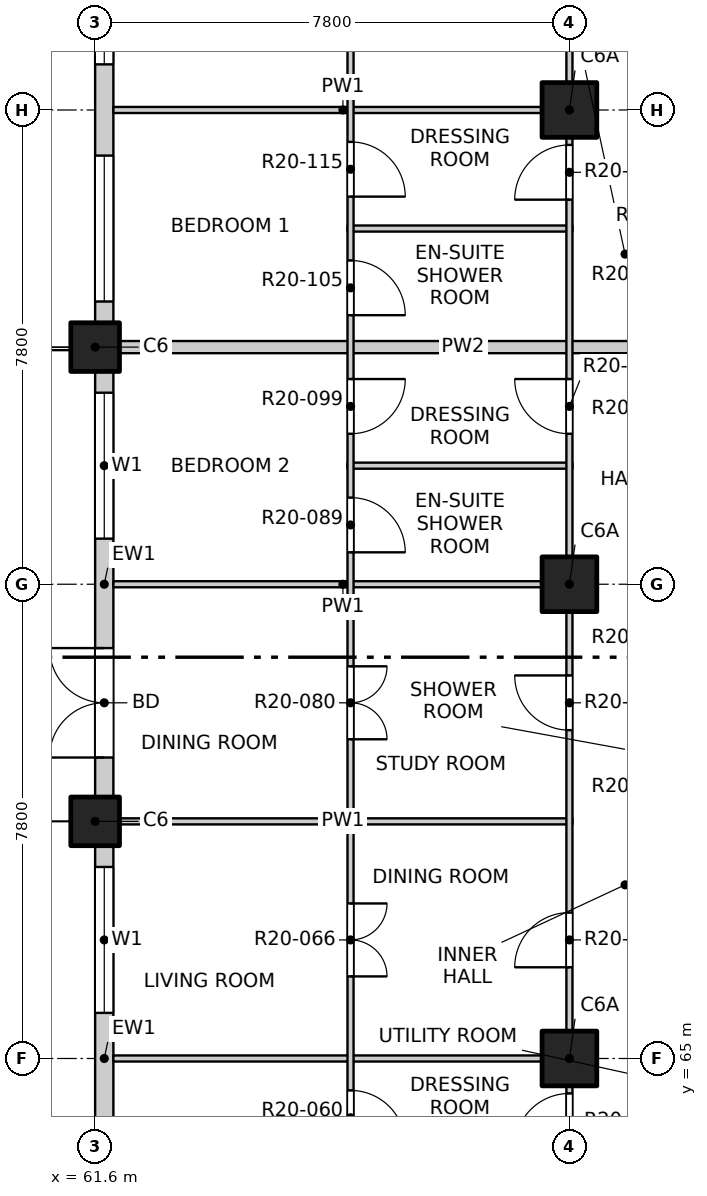
"""IFC4 building model, lengths in metres.
Left out: names, types, materials, properties, quantities, classifications, styles, units other than length and angle.
Written with IfcOpenShell. Run it as: python <this file> out.ifc"""

import sys

from ifc_helpers import new_model, si_unit, direction, frame, frame_2d, origin, origin_2d, place, context, subcontext, project, spatial, rectangle, extrude, element, fill, save


model = new_model("IFC4")
c1 = context("Model", 3, precision=1e-05, world=origin(), true_north=direction((0.0, 1.0)))
c2 = subcontext(c1, "Body", "Model", "MODEL_VIEW")
j1 = project(units=[si_unit("LENGTHUNIT", "METRE"), si_unit("PLANEANGLEUNIT", "RADIAN")], contexts=[c1])
p1 = place(None, origin())
s1 = spatial("IfcSite", under=j1, at=p1, CompositionType="ELEMENT")
p2 = place(p1, origin())
s2 = spatial("IfcBuilding", under=s1, at=p2, CompositionType="ELEMENT")
p3 = place(p2, frame((0.0, 0.0, 204.1)))
s3 = spatial("IfcBuildingStorey", under=s2, at=p3, CompositionType="ELEMENT", Elevation=204.1)
for number, where, z_axis, x_axis in (
    (1, (61.6, 68.9, -0.25), (0.0, 0.0, 1.0), (1.0, 0.0, 0.0)),
    (2, (61.6, 76.7, -0.25), (0.0, 0.0, 1.0), (1.0, 0.0, 0.0)),
):
    element("IfcColumn", number, at=place(p3, frame(where, z_axis=z_axis, x_axis=x_axis)), inside=s3, PredefinedType="COLUMN", context=c2, shape_type="SweptSolid", body=[
        extrude(rectangle(XDim=0.8, YDim=0.8, at=origin_2d()), origin(), (0.0, 0.0, 1.0), 3.4),
    ])
for number, where, z_axis, x_axis in (
    (3, (69.4, 65.0, -0.25), (0.0, 0.0, 1.0), (1.0, 0.0, 0.0)),
    (4, (69.4, 72.8, -0.25), (0.0, 0.0, 1.0), (1.0, 0.0, 0.0)),
    (5, (69.4, 80.6, -0.25), (0.0, 0.0, 1.0), (1.0, 0.0, 0.0)),
):
    element("IfcColumn", number, at=place(p3, frame(where, z_axis=z_axis, x_axis=x_axis)), inside=s3, PredefinedType="COLUMN", context=c2, shape_type="SweptSolid", body=[
        extrude(rectangle(XDim=0.9, YDim=0.9, at=origin_2d()), origin(), (0.0, 0.0, 1.0), 3.4),
    ])
p4 = place(p3, frame((61.75, 61.5, 0.0), z_axis=(0.0, 0.0, 1.0), x_axis=(0.0, 1.0, 0.0)))
e6 = element("IfcWall", 6, at=p4, inside=s3, PredefinedType="SOLIDWALL", context=c2, shape_type="SweptSolid", body=[
    extrude(rectangle(XDim=7.0, YDim=0.3, at=frame_2d((3.5, 0.0))), origin(), (0.0, 0.0, 1.0), 2.7),
])
p5 = place(p4, frame((0.65, 0.0, 0.0)))
e7 = element("IfcOpeningElement", 7, at=p5, cuts=e6, PredefinedType="OPENING", context=c2, shape_type="SweptSolid", body=[
    extrude(rectangle(XDim=1.8, YDim=2.4, at=frame_2d((0.9, 1.2))), frame((0.0, 0.16, 0.0), z_axis=(0.0, -1.0, 0.0), x_axis=(1.0, 0.0, 0.0)), (0.0, 0.0, 1.0), 0.32),
])
p6 = place(p4, frame((4.25, 0.0, 0.9)))
e8 = element("IfcOpeningElement", 8, at=p6, cuts=e6, PredefinedType="OPENING", context=c2, shape_type="SweptSolid", body=[
    extrude(rectangle(XDim=2.4, YDim=1.8, at=frame_2d((1.2, 0.9))), frame((0.0, 0.16, 0.0), z_axis=(0.0, -1.0, 0.0), x_axis=(1.0, 0.0, 0.0)), (0.0, 0.0, 1.0), 0.32),
])
p7 = place(p3, frame((61.75, 69.3, 0.0), z_axis=(0.0, 0.0, 1.0), x_axis=(0.0, 1.0, 0.0)))
e9 = element("IfcWall", 9, at=p7, inside=s3, PredefinedType="SOLIDWALL", context=c2, shape_type="SweptSolid", body=[
    extrude(rectangle(XDim=7.0, YDim=0.3, at=frame_2d((3.5, 0.0))), origin(), (0.0, 0.0, 1.0), 2.7),
])
p8 = place(p7, frame((0.65, 0.0, 0.0)))
e10 = element("IfcOpeningElement", 10, at=p8, cuts=e9, PredefinedType="OPENING", context=c2, shape_type="SweptSolid", body=[
    extrude(rectangle(XDim=1.8, YDim=2.4, at=frame_2d((0.9, 1.2))), frame((0.0, 0.16, 0.0), z_axis=(0.0, -1.0, 0.0), x_axis=(1.0, 0.0, 0.0)), (0.0, 0.0, 1.0), 0.32),
])
p9 = place(p7, frame((4.25, 0.0, 0.9)))
e11 = element("IfcOpeningElement", 11, at=p9, cuts=e9, PredefinedType="OPENING", context=c2, shape_type="SweptSolid", body=[
    extrude(rectangle(XDim=2.4, YDim=1.8, at=frame_2d((1.2, 0.9))), frame((0.0, 0.16, 0.0), z_axis=(0.0, -1.0, 0.0), x_axis=(1.0, 0.0, 0.0)), (0.0, 0.0, 1.0), 0.32),
])
p10 = place(p3, frame((61.75, 77.1, 0.0), z_axis=(0.0, 0.0, 1.0), x_axis=(0.0, 1.0, 0.0)))
e12 = element("IfcWall", 12, at=p10, inside=s3, PredefinedType="SOLIDWALL", context=c2, shape_type="SweptSolid", body=[
    extrude(rectangle(XDim=7.4, YDim=0.3, at=frame_2d((3.7, 0.0))), origin(), (0.0, 0.0, 1.0), 2.7),
])
p11 = place(p10, frame((0.35, 0.0, 0.9)))
e13 = element("IfcOpeningElement", 13, at=p11, cuts=e12, PredefinedType="OPENING", context=c2, shape_type="SweptSolid", body=[
    extrude(rectangle(XDim=2.4, YDim=1.8, at=frame_2d((1.2, 0.9))), frame((0.0, 0.16, 0.0), z_axis=(0.0, -1.0, 0.0), x_axis=(1.0, 0.0, 0.0)), (0.0, 0.0, 1.0), 0.32),
])
p12 = place(p10, frame((4.25, 0.0, 0.9)))
e14 = element("IfcOpeningElement", 14, at=p12, cuts=e12, PredefinedType="OPENING", context=c2, shape_type="SweptSolid", body=[
    extrude(rectangle(XDim=2.4, YDim=1.8, at=frame_2d((1.2, 0.9))), frame((0.0, 0.16, 0.0), z_axis=(0.0, -1.0, 0.0), x_axis=(1.0, 0.0, 0.0)), (0.0, 0.0, 1.0), 0.32),
])
p13 = place(p3, frame((61.9, 65.0, 0.0), z_axis=(0.0, 0.0, 1.0), x_axis=(1.0, 0.0, 0.0)))
e15 = element("IfcWall", 15, at=p13, inside=s3, PredefinedType="PARTITIONING", context=c2, shape_type="SweptSolid", body=[
    extrude(rectangle(XDim=7.55, YDim=0.1, at=frame_2d((3.775, 0.0))), origin(), (0.0, 0.0, 1.0), 3.15),
])
p14 = place(p3, frame((61.9, 68.9, 0.0), z_axis=(0.0, 0.0, 1.0), x_axis=(1.0, 0.0, 0.0)))
e16 = element("IfcWall", 16, at=p14, inside=s3, PredefinedType="PARTITIONING", context=c2, shape_type="SweptSolid", body=[
    extrude(rectangle(XDim=7.55, YDim=0.1, at=frame_2d((3.775, 0.0))), origin(), (0.0, 0.0, 1.0), 2.55),
])
p15 = place(p3, frame((61.9, 72.8, 0.0), z_axis=(0.0, 0.0, 1.0), x_axis=(1.0, 0.0, 0.0)))
e17 = element("IfcWall", 17, at=p15, inside=s3, PredefinedType="PARTITIONING", context=c2, shape_type="SweptSolid", body=[
    extrude(rectangle(XDim=7.55, YDim=0.1, at=frame_2d((3.775, 0.0))), origin(), (0.0, 0.0, 1.0), 3.15),
])
p16 = place(p3, frame((65.75, 74.75, 0.0), z_axis=(0.0, 0.0, 1.0), x_axis=(1.0, 0.0, 0.0)))
e18 = element("IfcWall", 18, at=p16, inside=s3, PredefinedType="PARTITIONING", context=c2, shape_type="SweptSolid", body=[
    extrude(rectangle(XDim=3.7, YDim=0.1, at=frame_2d((1.85, 0.0))), origin(), (0.0, 0.0, 1.0), 3.15),
])
p17 = place(p3, frame((61.9, 76.7, 0.0), z_axis=(0.0, 0.0, 1.0), x_axis=(1.0, 0.0, 0.0)))
e19 = element("IfcWall", 19, at=p17, inside=s3, PredefinedType="PARTITIONING", context=c2, shape_type="SweptSolid", body=[
    extrude(rectangle(XDim=11.5, YDim=0.2, at=frame_2d((5.75, 0.0))), origin(), (0.0, 0.0, 1.0), 2.55),
])
p18 = place(p3, frame((65.75, 78.65, 0.0), z_axis=(0.0, 0.0, 1.0), x_axis=(1.0, 0.0, 0.0)))
e20 = element("IfcWall", 20, at=p18, inside=s3, PredefinedType="PARTITIONING", context=c2, shape_type="SweptSolid", body=[
    extrude(rectangle(XDim=3.7, YDim=0.1, at=frame_2d((1.85, 0.0))), origin(), (0.0, 0.0, 1.0), 3.15),
])
p19 = place(p3, frame((61.9, 80.6, 0.0), z_axis=(0.0, 0.0, 1.0), x_axis=(1.0, 0.0, 0.0)))
e21 = element("IfcWall", 21, at=p19, inside=s3, PredefinedType="PARTITIONING", context=c2, shape_type="SweptSolid", body=[
    extrude(rectangle(XDim=7.55, YDim=0.1, at=frame_2d((3.775, 0.0))), origin(), (0.0, 0.0, 1.0), 3.15),
])
p20 = place(p3, frame((65.8, 61.2, 0.0), z_axis=(0.0, 0.0, 1.0), x_axis=(0.0, 1.0, 0.0)))
e22 = element("IfcWall", 22, at=p20, inside=s3, PredefinedType="PARTITIONING", context=c2, shape_type="SweptSolid", body=[
    extrude(rectangle(XDim=26.9, YDim=0.1, at=frame_2d((13.45, 0.0))), origin(), (0.0, 0.0, 1.0), 3.15),
])
p21 = place(p20, frame((0.425, 0.0, 0.0)))
e23 = element("IfcOpeningElement", 23, at=p21, cuts=e22, PredefinedType="OPENING", context=c2, shape_type="SweptSolid", body=[
    extrude(rectangle(XDim=0.9, YDim=2.1, at=frame_2d((0.45, 1.05))), frame((0.0, 0.06, 0.0), z_axis=(0.0, -1.0, 0.0), x_axis=(1.0, 0.0, 0.0)), (0.0, 0.0, 1.0), 0.12),
])
p22 = place(p20, frame((2.375, 0.0, 0.0)))
e24 = element("IfcOpeningElement", 24, at=p22, cuts=e22, PredefinedType="OPENING", context=c2, shape_type="SweptSolid", body=[
    extrude(rectangle(XDim=0.9, YDim=2.1, at=frame_2d((0.45, 1.05))), frame((0.0, 0.06, 0.0), z_axis=(0.0, -1.0, 0.0), x_axis=(1.0, 0.0, 0.0)), (0.0, 0.0, 1.0), 0.12),
])
p23 = place(p20, frame((5.15, 0.0, 0.0)))
e25 = element("IfcOpeningElement", 25, at=p23, cuts=e22, PredefinedType="OPENING", context=c2, shape_type="SweptSolid", body=[
    extrude(rectangle(XDim=1.2, YDim=2.1, at=frame_2d((0.6, 1.05))), frame((0.0, 0.06, 0.0), z_axis=(0.0, -1.0, 0.0), x_axis=(1.0, 0.0, 0.0)), (0.0, 0.0, 1.0), 0.12),
])
p24 = place(p20, frame((9.05, 0.0, 0.0)))
e26 = element("IfcOpeningElement", 26, at=p24, cuts=e22, PredefinedType="OPENING", context=c2, shape_type="SweptSolid", body=[
    extrude(rectangle(XDim=1.2, YDim=2.1, at=frame_2d((0.6, 1.05))), frame((0.0, 0.06, 0.0), z_axis=(0.0, -1.0, 0.0), x_axis=(1.0, 0.0, 0.0)), (0.0, 0.0, 1.0), 0.12),
])
p25 = place(p20, frame((12.125, 0.0, 0.0)))
e27 = element("IfcOpeningElement", 27, at=p25, cuts=e22, PredefinedType="OPENING", context=c2, shape_type="SweptSolid", body=[
    extrude(rectangle(XDim=0.9, YDim=2.1, at=frame_2d((0.45, 1.05))), frame((0.0, 0.06, 0.0), z_axis=(0.0, -1.0, 0.0), x_axis=(1.0, 0.0, 0.0)), (0.0, 0.0, 1.0), 0.12),
])
p26 = place(p20, frame((14.075, 0.0, 0.0)))
e28 = element("IfcOpeningElement", 28, at=p26, cuts=e22, PredefinedType="OPENING", context=c2, shape_type="SweptSolid", body=[
    extrude(rectangle(XDim=0.9, YDim=2.1, at=frame_2d((0.45, 1.05))), frame((0.0, 0.06, 0.0), z_axis=(0.0, -1.0, 0.0), x_axis=(1.0, 0.0, 0.0)), (0.0, 0.0, 1.0), 0.12),
])
p27 = place(p20, frame((16.025, 0.0, 0.0)))
e29 = element("IfcOpeningElement", 29, at=p27, cuts=e22, PredefinedType="OPENING", context=c2, shape_type="SweptSolid", body=[
    extrude(rectangle(XDim=0.9, YDim=2.1, at=frame_2d((0.45, 1.05))), frame((0.0, 0.06, 0.0), z_axis=(0.0, -1.0, 0.0), x_axis=(1.0, 0.0, 0.0)), (0.0, 0.0, 1.0), 0.12),
])
p28 = place(p20, frame((17.975, 0.0, 0.0)))
e30 = element("IfcOpeningElement", 30, at=p28, cuts=e22, PredefinedType="OPENING", context=c2, shape_type="SweptSolid", body=[
    extrude(rectangle(XDim=0.9, YDim=2.1, at=frame_2d((0.45, 1.05))), frame((0.0, 0.06, 0.0), z_axis=(0.0, -1.0, 0.0), x_axis=(1.0, 0.0, 0.0)), (0.0, 0.0, 1.0), 0.12),
])
p29 = place(p20, frame((20.75, 0.0, 0.0)))
e31 = element("IfcOpeningElement", 31, at=p29, cuts=e22, PredefinedType="OPENING", context=c2, shape_type="SweptSolid", body=[
    extrude(rectangle(XDim=1.2, YDim=2.1, at=frame_2d((0.6, 1.05))), frame((0.0, 0.06, 0.0), z_axis=(0.0, -1.0, 0.0), x_axis=(1.0, 0.0, 0.0)), (0.0, 0.0, 1.0), 0.12),
])
p30 = place(p20, frame((24.65, 0.0, 0.0)))
e32 = element("IfcOpeningElement", 32, at=p30, cuts=e22, PredefinedType="OPENING", context=c2, shape_type="SweptSolid", body=[
    extrude(rectangle(XDim=1.2, YDim=2.1, at=frame_2d((0.6, 1.05))), frame((0.0, 0.06, 0.0), z_axis=(0.0, -1.0, 0.0), x_axis=(1.0, 0.0, 0.0)), (0.0, 0.0, 1.0), 0.12),
])
p31 = place(p3, frame((69.4, 41.9, 0.0), z_axis=(0.0, 0.0, 1.0), x_axis=(0.0, 1.0, 0.0)))
e33 = element("IfcWall", 33, at=p31, inside=s3, PredefinedType="PARTITIONING", context=c2, shape_type="SweptSolid", body=[
    extrude(rectangle(XDim=46.2, YDim=0.1, at=frame_2d((23.1, 0.0))), origin(), (0.0, 0.0, 1.0), 3.15),
])
p32 = place(p31, frame((1.2, 0.0, 0.0)))
e34 = element("IfcOpeningElement", 34, at=p32, cuts=e33, PredefinedType="OPENING", context=c2, shape_type="SweptSolid", body=[
    extrude(rectangle(XDim=0.9, YDim=2.1, at=frame_2d((0.45, 1.05))), frame((0.0, 0.06, 0.0), z_axis=(0.0, -1.0, 0.0), x_axis=(1.0, 0.0, 0.0)), (0.0, 0.0, 1.0), 0.12),
])
p33 = place(p31, frame((5.1, 0.0, 0.0)))
e35 = element("IfcOpeningElement", 35, at=p33, cuts=e33, PredefinedType="OPENING", context=c2, shape_type="SweptSolid", body=[
    extrude(rectangle(XDim=0.9, YDim=2.1, at=frame_2d((0.45, 1.05))), frame((0.0, 0.06, 0.0), z_axis=(0.0, -1.0, 0.0), x_axis=(1.0, 0.0, 0.0)), (0.0, 0.0, 1.0), 0.12),
])
p34 = place(p31, frame((9.975, 0.0, 0.0)))
e36 = element("IfcOpeningElement", 36, at=p34, cuts=e33, PredefinedType="OPENING", context=c2, shape_type="SweptSolid", body=[
    extrude(rectangle(XDim=0.9, YDim=2.1, at=frame_2d((0.45, 1.05))), frame((0.0, 0.06, 0.0), z_axis=(0.0, -1.0, 0.0), x_axis=(1.0, 0.0, 0.0)), (0.0, 0.0, 1.0), 0.12),
])
p35 = place(p31, frame((12.9, 0.0, 0.0)))
e37 = element("IfcOpeningElement", 37, at=p35, cuts=e33, PredefinedType="OPENING", context=c2, shape_type="SweptSolid", body=[
    extrude(rectangle(XDim=0.9, YDim=2.1, at=frame_2d((0.45, 1.05))), frame((0.0, 0.06, 0.0), z_axis=(0.0, -1.0, 0.0), x_axis=(1.0, 0.0, 0.0)), (0.0, 0.0, 1.0), 0.12),
])
p36 = place(p31, frame((17.775, 0.0, 0.0)))
e38 = element("IfcOpeningElement", 38, at=p36, cuts=e33, PredefinedType="OPENING", context=c2, shape_type="SweptSolid", body=[
    extrude(rectangle(XDim=0.9, YDim=2.1, at=frame_2d((0.45, 1.05))), frame((0.0, 0.06, 0.0), z_axis=(0.0, -1.0, 0.0), x_axis=(1.0, 0.0, 0.0)), (0.0, 0.0, 1.0), 0.12),
])
p37 = place(p31, frame((21.625, 0.0, 0.0)))
e39 = element("IfcOpeningElement", 39, at=p37, cuts=e33, PredefinedType="OPENING", context=c2, shape_type="SweptSolid", body=[
    extrude(rectangle(XDim=0.9, YDim=2.1, at=frame_2d((0.45, 1.05))), frame((0.0, 0.06, 0.0), z_axis=(0.0, -1.0, 0.0), x_axis=(1.0, 0.0, 0.0)), (0.0, 0.0, 1.0), 0.12),
])
p38 = place(p31, frame((24.6, 0.0, 0.0)))
e40 = element("IfcOpeningElement", 40, at=p38, cuts=e33, PredefinedType="OPENING", context=c2, shape_type="SweptSolid", body=[
    extrude(rectangle(XDim=0.9, YDim=2.1, at=frame_2d((0.45, 1.05))), frame((0.0, 0.06, 0.0), z_axis=(0.0, -1.0, 0.0), x_axis=(1.0, 0.0, 0.0)), (0.0, 0.0, 1.0), 0.12),
])
p39 = place(p31, frame((28.5, 0.0, 0.0)))
e41 = element("IfcOpeningElement", 41, at=p39, cuts=e33, PredefinedType="OPENING", context=c2, shape_type="SweptSolid", body=[
    extrude(rectangle(XDim=0.9, YDim=2.1, at=frame_2d((0.45, 1.05))), frame((0.0, 0.06, 0.0), z_axis=(0.0, -1.0, 0.0), x_axis=(1.0, 0.0, 0.0)), (0.0, 0.0, 1.0), 0.12),
])
p40 = place(p31, frame((33.375, 0.0, 0.0)))
e42 = element("IfcOpeningElement", 42, at=p40, cuts=e33, PredefinedType="OPENING", context=c2, shape_type="SweptSolid", body=[
    extrude(rectangle(XDim=0.9, YDim=2.1, at=frame_2d((0.45, 1.05))), frame((0.0, 0.06, 0.0), z_axis=(0.0, -1.0, 0.0), x_axis=(1.0, 0.0, 0.0)), (0.0, 0.0, 1.0), 0.12),
])
p41 = place(p31, frame((37.225, 0.0, 0.0)))
e43 = element("IfcOpeningElement", 43, at=p41, cuts=e33, PredefinedType="OPENING", context=c2, shape_type="SweptSolid", body=[
    extrude(rectangle(XDim=0.9, YDim=2.1, at=frame_2d((0.45, 1.05))), frame((0.0, 0.06, 0.0), z_axis=(0.0, -1.0, 0.0), x_axis=(1.0, 0.0, 0.0)), (0.0, 0.0, 1.0), 0.12),
])
p42 = place(p31, frame((40.2, 0.0, 0.0)))
e44 = element("IfcOpeningElement", 44, at=p42, cuts=e33, PredefinedType="OPENING", context=c2, shape_type="SweptSolid", body=[
    extrude(rectangle(XDim=0.9, YDim=2.1, at=frame_2d((0.45, 1.05))), frame((0.0, 0.06, 0.0), z_axis=(0.0, -1.0, 0.0), x_axis=(1.0, 0.0, 0.0)), (0.0, 0.0, 1.0), 0.12),
])
p43 = place(p31, frame((44.1, 0.0, 0.0)))
e45 = element("IfcOpeningElement", 45, at=p43, cuts=e33, PredefinedType="OPENING", context=c2, shape_type="SweptSolid", body=[
    extrude(rectangle(XDim=0.9, YDim=2.1, at=frame_2d((0.45, 1.05))), frame((0.0, 0.06, 0.0), z_axis=(0.0, -1.0, 0.0), x_axis=(1.0, 0.0, 0.0)), (0.0, 0.0, 1.0), 0.12),
])
p44 = place(p6, origin())
e46 = element("IfcWindow", 46, at=p44, inside=s3, PartitioningType="DOUBLE_PANEL_VERTICAL", PredefinedType="WINDOW", context=c2, shape_type="SweptSolid", body=[
    extrude(rectangle(XDim=2.4, YDim=1.8, at=frame_2d((1.2, 0.9))), frame((0.0, 0.03, 0.0), z_axis=(0.0, -1.0, 0.0), x_axis=(1.0, 0.0, 0.0)), (0.0, 0.0, 1.0), 0.06),
])
fill(e8, e46)
p45 = place(p8, origin())
e47 = element("IfcDoor", 47, at=p45, inside=s3, OperationType="DOUBLE_DOOR_SINGLE_SWING", PredefinedType="DOOR", context=c2, shape_type="SweptSolid", body=[
    extrude(rectangle(XDim=1.8, YDim=2.4, at=frame_2d((0.9, 1.2))), frame((0.0, 0.025, 0.0), z_axis=(0.0, -1.0, 0.0), x_axis=(1.0, 0.0, 0.0)), (0.0, 0.0, 1.0), 0.05),
])
fill(e10, e47)
p46 = place(p9, origin())
e48 = element("IfcWindow", 48, at=p46, inside=s3, PartitioningType="DOUBLE_PANEL_VERTICAL", PredefinedType="WINDOW", context=c2, shape_type="SweptSolid", body=[
    extrude(rectangle(XDim=2.4, YDim=1.8, at=frame_2d((1.2, 0.9))), frame((0.0, 0.03, 0.0), z_axis=(0.0, -1.0, 0.0), x_axis=(1.0, 0.0, 0.0)), (0.0, 0.0, 1.0), 0.06),
])
fill(e11, e48)
p47 = place(p11, origin())
e49 = element("IfcWindow", 49, at=p47, inside=s3, PartitioningType="DOUBLE_PANEL_VERTICAL", PredefinedType="WINDOW", context=c2, shape_type="SweptSolid", body=[
    extrude(rectangle(XDim=2.4, YDim=1.8, at=frame_2d((1.2, 0.9))), frame((0.0, 0.03, 0.0), z_axis=(0.0, -1.0, 0.0), x_axis=(1.0, 0.0, 0.0)), (0.0, 0.0, 1.0), 0.06),
])
fill(e13, e49)
p48 = place(p12, origin())
e50 = element("IfcWindow", 50, at=p48, inside=s3, PartitioningType="DOUBLE_PANEL_VERTICAL", PredefinedType="WINDOW", context=c2, shape_type="SweptSolid", body=[
    extrude(rectangle(XDim=2.4, YDim=1.8, at=frame_2d((1.2, 0.9))), frame((0.0, 0.03, 0.0), z_axis=(0.0, -1.0, 0.0), x_axis=(1.0, 0.0, 0.0)), (0.0, 0.0, 1.0), 0.06),
])
fill(e14, e50)
p49 = place(p37, origin())
e51 = element("IfcDoor", 51, at=p49, inside=s3, OperationType="SINGLE_SWING_LEFT", PredefinedType="DOOR", context=c2, shape_type="SweptSolid", body=[
    extrude(rectangle(XDim=0.9, YDim=2.1, at=frame_2d((0.45, 1.05))), frame((0.0, 0.025, 0.0), z_axis=(0.0, -1.0, 0.0), x_axis=(1.0, 0.0, 0.0)), (0.0, 0.0, 1.0), 0.05),
])
fill(e39, e51)
p50 = place(p22, origin())
e52 = element("IfcDoor", 52, at=p50, inside=s3, OperationType="SINGLE_SWING_RIGHT", PredefinedType="DOOR", context=c2, shape_type="SweptSolid", body=[
    extrude(rectangle(XDim=0.9, YDim=2.1, at=frame_2d((0.45, 1.05))), frame((0.0, 0.025, 0.0), z_axis=(0.0, -1.0, 0.0), x_axis=(1.0, 0.0, 0.0)), (0.0, 0.0, 1.0), 0.05),
])
fill(e24, e52)
p51 = place(p23, origin())
e53 = element("IfcDoor", 53, at=p51, inside=s3, OperationType="DOUBLE_DOOR_SINGLE_SWING", PredefinedType="DOOR", context=c2, shape_type="SweptSolid", body=[
    extrude(rectangle(XDim=1.2, YDim=2.1, at=frame_2d((0.6, 1.05))), frame((0.0, 0.025, 0.0), z_axis=(0.0, -1.0, 0.0), x_axis=(1.0, 0.0, 0.0)), (0.0, 0.0, 1.0), 0.05),
])
fill(e25, e53)
p52 = place(p38, origin())
e54 = element("IfcDoor", 54, at=p52, inside=s3, OperationType="SINGLE_SWING_LEFT", PredefinedType="DOOR", context=c2, shape_type="SweptSolid", body=[
    extrude(rectangle(XDim=0.9, YDim=2.1, at=frame_2d((0.45, 1.05))), frame((0.0, 0.025, 0.0), z_axis=(0.0, -1.0, 0.0), x_axis=(1.0, 0.0, 0.0)), (0.0, 0.0, 1.0), 0.05),
])
fill(e40, e54)
p53 = place(p24, origin())
e55 = element("IfcDoor", 55, at=p53, inside=s3, OperationType="DOUBLE_DOOR_SINGLE_SWING", PredefinedType="DOOR", context=c2, shape_type="SweptSolid", body=[
    extrude(rectangle(XDim=1.2, YDim=2.1, at=frame_2d((0.6, 1.05))), frame((0.0, 0.025, 0.0), z_axis=(0.0, -1.0, 0.0), x_axis=(1.0, 0.0, 0.0)), (0.0, 0.0, 1.0), 0.05),
])
fill(e26, e55)
p54 = place(p39, origin())
e56 = element("IfcDoor", 56, at=p54, inside=s3, OperationType="SINGLE_SWING_RIGHT", PredefinedType="DOOR", context=c2, shape_type="SweptSolid", body=[
    extrude(rectangle(XDim=0.9, YDim=2.1, at=frame_2d((0.45, 1.05))), frame((0.0, 0.025, 0.0), z_axis=(0.0, -1.0, 0.0), x_axis=(1.0, 0.0, 0.0)), (0.0, 0.0, 1.0), 0.05),
])
fill(e41, e56)
p55 = place(p25, origin())
e57 = element("IfcDoor", 57, at=p55, inside=s3, OperationType="SINGLE_SWING_RIGHT", PredefinedType="DOOR", context=c2, shape_type="SweptSolid", body=[
    extrude(rectangle(XDim=0.9, YDim=2.1, at=frame_2d((0.45, 1.05))), frame((0.0, 0.025, 0.0), z_axis=(0.0, -1.0, 0.0), x_axis=(1.0, 0.0, 0.0)), (0.0, 0.0, 1.0), 0.05),
])
fill(e27, e57)
p56 = place(p26, origin())
e58 = element("IfcDoor", 58, at=p56, inside=s3, OperationType="SINGLE_SWING_LEFT", PredefinedType="DOOR", context=c2, shape_type="SweptSolid", body=[
    extrude(rectangle(XDim=0.9, YDim=2.1, at=frame_2d((0.45, 1.05))), frame((0.0, 0.025, 0.0), z_axis=(0.0, -1.0, 0.0), x_axis=(1.0, 0.0, 0.0)), (0.0, 0.0, 1.0), 0.05),
])
fill(e28, e58)
p57 = place(p40, origin())
e59 = element("IfcDoor", 59, at=p57, inside=s3, OperationType="SINGLE_SWING_RIGHT", PredefinedType="DOOR", context=c2, shape_type="SweptSolid", body=[
    extrude(rectangle(XDim=0.9, YDim=2.1, at=frame_2d((0.45, 1.05))), frame((0.0, 0.025, 0.0), z_axis=(0.0, -1.0, 0.0), x_axis=(1.0, 0.0, 0.0)), (0.0, 0.0, 1.0), 0.05),
])
fill(e42, e59)
p58 = place(p27, origin())
e60 = element("IfcDoor", 60, at=p58, inside=s3, OperationType="SINGLE_SWING_RIGHT", PredefinedType="DOOR", context=c2, shape_type="SweptSolid", body=[
    extrude(rectangle(XDim=0.9, YDim=2.1, at=frame_2d((0.45, 1.05))), frame((0.0, 0.025, 0.0), z_axis=(0.0, -1.0, 0.0), x_axis=(1.0, 0.0, 0.0)), (0.0, 0.0, 1.0), 0.05),
])
fill(e29, e60)
p59 = place(p41, origin())
e61 = element("IfcDoor", 61, at=p59, inside=s3, OperationType="SINGLE_SWING_LEFT", PredefinedType="DOOR", context=c2, shape_type="SweptSolid", body=[
    extrude(rectangle(XDim=0.9, YDim=2.1, at=frame_2d((0.45, 1.05))), frame((0.0, 0.025, 0.0), z_axis=(0.0, -1.0, 0.0), x_axis=(1.0, 0.0, 0.0)), (0.0, 0.0, 1.0), 0.05),
])
fill(e43, e61)
p60 = place(p28, origin())
e62 = element("IfcDoor", 62, at=p60, inside=s3, OperationType="SINGLE_SWING_RIGHT", PredefinedType="DOOR", context=c2, shape_type="SweptSolid", body=[
    extrude(rectangle(XDim=0.9, YDim=2.1, at=frame_2d((0.45, 1.05))), frame((0.0, 0.025, 0.0), z_axis=(0.0, -1.0, 0.0), x_axis=(1.0, 0.0, 0.0)), (0.0, 0.0, 1.0), 0.05),
])
fill(e30, e62)
save(model, sys.argv[1])
